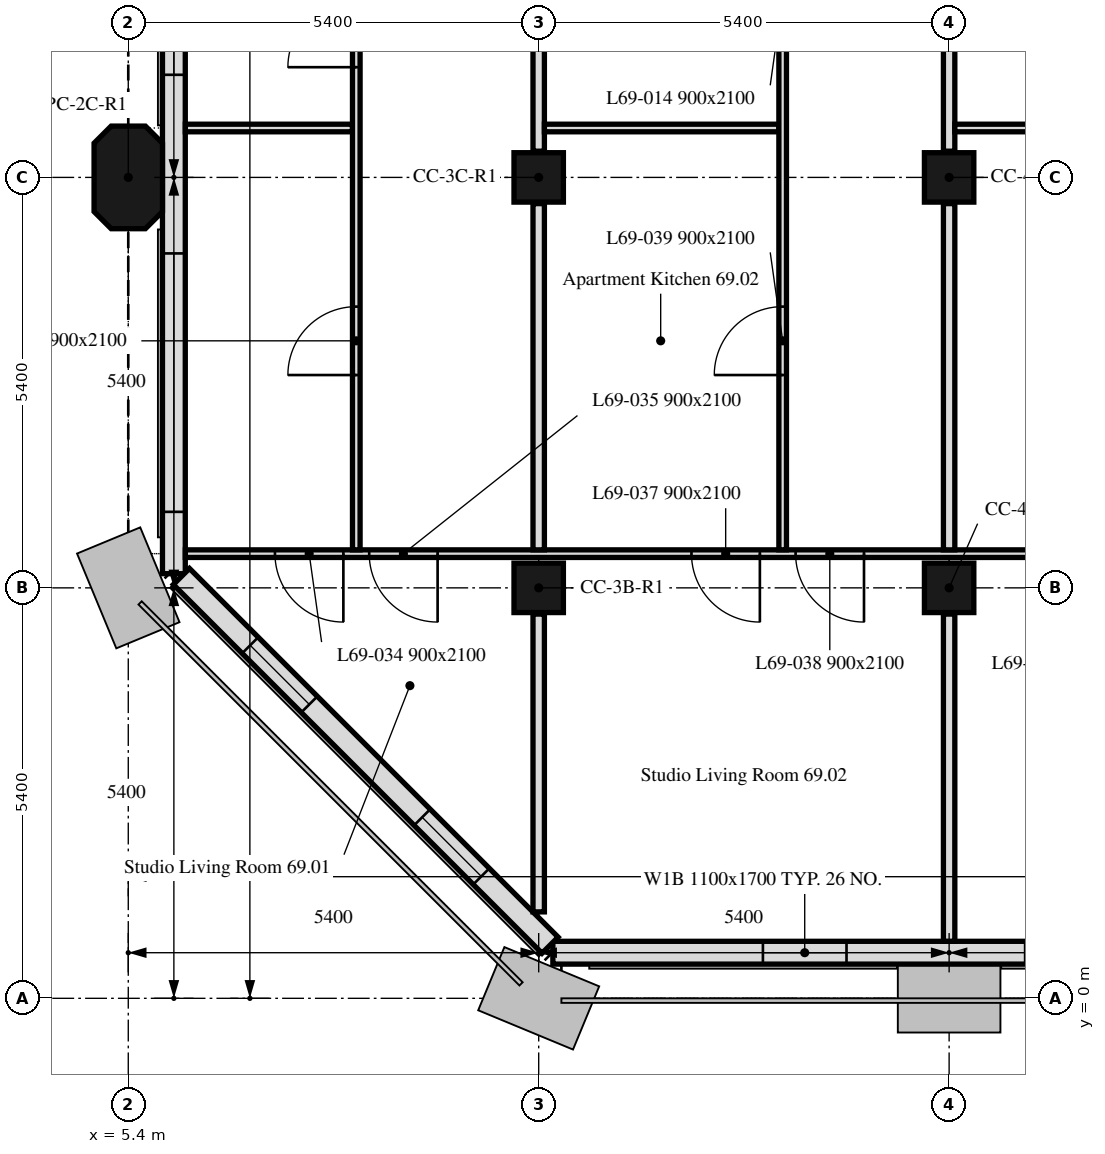
"""IFC4 building model, lengths in metres.
Left out: names, types, materials, properties, quantities, classifications, styles, units other than length and angle.
Written with IfcOpenShell. Run it as: python <this file> out.ifc"""

import sys

from ifc_helpers import new_model, si_unit, direction, frame, frame_2d, origin, origin_2d, place, context, subcontext, project, spatial, polyline, rectangle, outline, extrude, element, fill, save


model = new_model("IFC4")
c1 = context("Model", 3, precision=1e-05, world=origin(), true_north=direction((0.0, 1.0)))
c2 = subcontext(c1, "Body", "Model", "MODEL_VIEW")
j1 = project(units=[si_unit("LENGTHUNIT", "METRE"), si_unit("PLANEANGLEUNIT", "RADIAN")], contexts=[c1])
p1 = place(None, origin())
s1 = spatial("IfcSite", under=j1, at=p1, CompositionType="ELEMENT")
p2 = place(p1, origin())
s2 = spatial("IfcBuilding", under=s1, at=p2, CompositionType="ELEMENT")
p3 = place(p2, frame((0.0, 0.0, 281.8)))
s3 = spatial("IfcBuildingStorey", under=s2, at=p3, CompositionType="ELEMENT", Elevation=281.8)
for number, where, z_axis, x_axis in (
    (1, (10.8, 5.4, 0.0), (0.0, 0.0, 1.0), (1.0, 0.0, 0.0)),
    (2, (16.2, 5.4, 0.0), (0.0, 0.0, 1.0), (1.0, 0.0, 0.0)),
):
    element("IfcColumn", number, at=place(p3, frame(where, z_axis=z_axis, x_axis=x_axis)), inside=s3, PredefinedType="COLUMN", context=c2, shape_type="SweptSolid", body=[
        extrude(rectangle(XDim=0.65, YDim=0.65, at=origin_2d()), origin(), (0.0, 0.0, 1.0), 3.0),
    ])
p4 = place(p3, frame((5.4, 10.8, 0.0), z_axis=(0.0, 0.0, 1.0), x_axis=(0.0, 1.0, 0.0)))
e3 = element("IfcColumn", 3, at=p4, inside=s3, PredefinedType="COLUMN", context=c2, shape_type="SweptSolid", body=[
    extrude(outline(polyline([(-0.45, -0.45), (0.45, -0.45), (0.675, -0.225), (0.675, 0.225), (0.45, 0.45), (-0.45, 0.45), (-0.675, 0.225), (-0.675, -0.225), (-0.45, -0.45)])), origin(), (0.0, 0.0, 1.0), 3.0),
])
for number, where, z_axis, x_axis in (
    (4, (10.8, 10.8, 0.0), (0.0, 0.0, 1.0), (1.0, 0.0, 0.0)),
    (5, (16.2, 10.8, 0.0), (0.0, 0.0, 1.0), (1.0, 0.0, 0.0)),
):
    element("IfcColumn", number, at=place(p3, frame(where, z_axis=z_axis, x_axis=x_axis)), inside=s3, PredefinedType="COLUMN", context=c2, shape_type="SweptSolid", body=[
        extrude(rectangle(XDim=0.65, YDim=0.65, at=origin_2d()), origin(), (0.0, 0.0, 1.0), 3.0),
    ])
p5 = place(p3, frame((10.986, 0.6, 0.0), z_axis=(0.0, 0.0, 1.0), x_axis=(1.0, 0.0, 0.0)))
e6 = element("IfcWall", 6, at=p5, inside=s3, PredefinedType="SOLIDWALL", context=c2, shape_type="SweptSolid", body=[
    extrude(rectangle(XDim=32.027, YDim=0.3, at=frame_2d((16.014, 0.0))), origin(), (0.0, 0.0, 1.0), 3.0),
])
p6 = place(p5, frame((2.764, 0.0, 0.9)))
e7 = element("IfcOpeningElement", 7, at=p6, cuts=e6, PredefinedType="OPENING", context=c2, shape_type="SweptSolid", body=[
    extrude(rectangle(XDim=1.1, YDim=1.7, at=frame_2d((0.55, 0.85))), frame((0.0, 0.16, 0.0), z_axis=(0.0, -1.0, 0.0), x_axis=(1.0, 0.0, 0.0)), (0.0, 0.0, 1.0), 0.32),
])
p7 = place(p5, frame((6.214, 0.0, 0.9)))
e8 = element("IfcOpeningElement", 8, at=p7, cuts=e6, PredefinedType="OPENING", context=c2, shape_type="SweptSolid", body=[
    extrude(rectangle(XDim=3.4, YDim=1.7, at=frame_2d((1.7, 0.85))), frame((0.0, 0.16, 0.0), z_axis=(0.0, -1.0, 0.0), x_axis=(1.0, 0.0, 0.0)), (0.0, 0.0, 1.0), 0.32),
])
p8 = place(p5, frame((13.564, 0.0, 0.9)))
e9 = element("IfcOpeningElement", 9, at=p8, cuts=e6, PredefinedType="OPENING", context=c2, shape_type="SweptSolid", body=[
    extrude(rectangle(XDim=1.1, YDim=1.7, at=frame_2d((0.55, 0.85))), frame((0.0, 0.16, 0.0), z_axis=(0.0, -1.0, 0.0), x_axis=(1.0, 0.0, 0.0)), (0.0, 0.0, 1.0), 0.32),
])
p9 = place(p5, frame((17.014, 0.0, 0.9)))
e10 = element("IfcOpeningElement", 10, at=p9, cuts=e6, PredefinedType="OPENING", context=c2, shape_type="SweptSolid", body=[
    extrude(rectangle(XDim=3.4, YDim=1.7, at=frame_2d((1.7, 0.85))), frame((0.0, 0.16, 0.0), z_axis=(0.0, -1.0, 0.0), x_axis=(1.0, 0.0, 0.0)), (0.0, 0.0, 1.0), 0.32),
])
p10 = place(p5, frame((24.364, 0.0, 0.9)))
e11 = element("IfcOpeningElement", 11, at=p10, cuts=e6, PredefinedType="OPENING", context=c2, shape_type="SweptSolid", body=[
    extrude(rectangle(XDim=1.1, YDim=1.7, at=frame_2d((0.55, 0.85))), frame((0.0, 0.16, 0.0), z_axis=(0.0, -1.0, 0.0), x_axis=(1.0, 0.0, 0.0)), (0.0, 0.0, 1.0), 0.32),
])
p11 = place(p5, frame((27.814, 0.0, 0.9)))
e12 = element("IfcOpeningElement", 12, at=p11, cuts=e6, PredefinedType="OPENING", context=c2, shape_type="SweptSolid", body=[
    extrude(rectangle(XDim=3.4, YDim=1.7, at=frame_2d((1.7, 0.85))), frame((0.0, 0.16, 0.0), z_axis=(0.0, -1.0, 0.0), x_axis=(1.0, 0.0, 0.0)), (0.0, 0.0, 1.0), 0.32),
])
p12 = place(p3, frame((6.0, 16.2, 0.0), z_axis=(0.0, 0.0, 1.0), x_axis=(0.0, -1.0, 0.0)))
e13 = element("IfcWall", 13, at=p12, inside=s3, PredefinedType="SOLIDWALL", context=c2, shape_type="SweptSolid", body=[
    extrude(rectangle(XDim=10.614, YDim=0.3, at=frame_2d((5.307, 0.0))), origin(), (0.0, 0.0, 1.0), 3.0),
])
p13 = place(p12, frame((1.0, 0.0, 0.9)))
e14 = element("IfcOpeningElement", 14, at=p13, cuts=e13, PredefinedType="OPENING", context=c2, shape_type="SweptSolid", body=[
    extrude(rectangle(XDim=1.1, YDim=1.7, at=frame_2d((0.55, 0.85))), frame((0.0, 0.16, 0.0), z_axis=(0.0, -1.0, 0.0), x_axis=(1.0, 0.0, 0.0)), (0.0, 0.0, 1.0), 0.32),
])
p14 = place(p12, frame((2.95, 0.0, 0.9)))
e15 = element("IfcOpeningElement", 15, at=p14, cuts=e13, PredefinedType="OPENING", context=c2, shape_type="SweptSolid", body=[
    extrude(rectangle(XDim=1.1, YDim=1.7, at=frame_2d((0.55, 0.85))), frame((0.0, 0.16, 0.0), z_axis=(0.0, -1.0, 0.0), x_axis=(1.0, 0.0, 0.0)), (0.0, 0.0, 1.0), 0.32),
])
p15 = place(p12, frame((6.4, 0.0, 0.9)))
e16 = element("IfcOpeningElement", 16, at=p15, cuts=e13, PredefinedType="OPENING", context=c2, shape_type="SweptSolid", body=[
    extrude(rectangle(XDim=3.4, YDim=1.7, at=frame_2d((1.7, 0.85))), frame((0.0, 0.16, 0.0), z_axis=(0.0, -1.0, 0.0), x_axis=(1.0, 0.0, 0.0)), (0.0, 0.0, 1.0), 0.32),
])
p16 = place(p3, frame((6.099, 5.55, 0.0), z_axis=(0.0, 0.0, 1.0), x_axis=(0.707106781187, -0.707106781187, 0.0)))
e17 = element("IfcWall", 17, at=p16, inside=s3, PredefinedType="SOLIDWALL", context=c2, shape_type="SweptSolid", body=[
    extrude(rectangle(XDim=6.86, YDim=0.3, at=frame_2d((3.43, 0.0))), origin(), (0.0, 0.0, 1.0), 3.0),
])
p17 = place(p16, frame((1.28, 0.0, 0.9)))
e18 = element("IfcOpeningElement", 18, at=p17, cuts=e17, PredefinedType="OPENING", context=c2, shape_type="SweptSolid", body=[
    extrude(rectangle(XDim=1.1, YDim=1.7, at=frame_2d((0.55, 0.85))), frame((0.0, 0.16, 0.0), z_axis=(0.0, -1.0, 0.0), x_axis=(1.0, 0.0, 0.0)), (0.0, 0.0, 1.0), 0.32),
])
p18 = place(p16, frame((4.48, 0.0, 0.9)))
e19 = element("IfcOpeningElement", 19, at=p18, cuts=e17, PredefinedType="OPENING", context=c2, shape_type="SweptSolid", body=[
    extrude(rectangle(XDim=1.1, YDim=1.7, at=frame_2d((0.55, 0.85))), frame((0.0, 0.16, 0.0), z_axis=(0.0, -1.0, 0.0), x_axis=(1.0, 0.0, 0.0)), (0.0, 0.0, 1.0), 0.32),
])
p19 = place(p3, frame((10.8, 1.137, 0.0), z_axis=(0.0, 0.0, 1.0), x_axis=(0.0, 1.0, 0.0)))
e20 = element("IfcWall", 20, at=p19, inside=s3, PredefinedType="PARTITIONING", context=c2, shape_type="SweptSolid", body=[
    extrude(rectangle(XDim=3.918, YDim=0.15, at=frame_2d((1.959, 0.0))), origin(), (0.0, 0.0, 1.0), 3.0),
])
p20 = place(p3, frame((37.652, 5.85, 0.0), z_axis=(0.0, 0.0, 1.0), x_axis=(-1.0, 0.0, 0.0)))
e21 = element("IfcWall", 21, at=p20, inside=s3, PredefinedType="PARTITIONING", context=c2, shape_type="SweptSolid", body=[
    extrude(rectangle(XDim=31.501, YDim=0.1, at=frame_2d((15.75, 0.0))), origin(), (0.0, 0.0, 1.0), 2.4),
])
p21 = place(p20, frame((12.923, 0.0, 0.0)))
e22 = element("IfcOpeningElement", 22, at=p21, cuts=e21, PredefinedType="OPENING", context=c2, shape_type="SweptSolid", body=[
    extrude(rectangle(XDim=0.9, YDim=2.1, at=frame_2d((0.45, 1.05))), frame((0.0, 0.05, 0.0), z_axis=(0.0, -1.0, 0.0), x_axis=(1.0, 0.0, 0.0)), (0.0, 0.0, 1.0), 0.1),
])
p22 = place(p20, frame((29.422, 0.0, 0.0)))
e23 = element("IfcOpeningElement", 23, at=p22, cuts=e21, PredefinedType="OPENING", context=c2, shape_type="SweptSolid", body=[
    extrude(rectangle(XDim=0.9, YDim=2.1, at=frame_2d((0.45, 1.05))), frame((0.0, 0.05, 0.0), z_axis=(0.0, -1.0, 0.0), x_axis=(1.0, 0.0, 0.0)), (0.0, 0.0, 1.0), 0.1),
])
p23 = place(p20, frame((28.182, 0.0, 0.0)))
e24 = element("IfcOpeningElement", 24, at=p23, cuts=e21, PredefinedType="OPENING", context=c2, shape_type="SweptSolid", body=[
    extrude(rectangle(XDim=0.9, YDim=2.1, at=frame_2d((0.45, 1.05))), frame((0.0, 0.05, 0.0), z_axis=(0.0, -1.0, 0.0), x_axis=(1.0, 0.0, 0.0)), (0.0, 0.0, 1.0), 0.1),
])
p24 = place(p20, frame((23.942, 0.0, 0.0)))
e25 = element("IfcOpeningElement", 25, at=p24, cuts=e21, PredefinedType="OPENING", context=c2, shape_type="SweptSolid", body=[
    extrude(rectangle(XDim=0.9, YDim=2.1, at=frame_2d((0.45, 1.05))), frame((0.0, 0.05, 0.0), z_axis=(0.0, -1.0, 0.0), x_axis=(1.0, 0.0, 0.0)), (0.0, 0.0, 1.0), 0.1),
])
p25 = place(p20, frame((22.572, 0.0, 0.0)))
e26 = element("IfcOpeningElement", 26, at=p25, cuts=e21, PredefinedType="OPENING", context=c2, shape_type="SweptSolid", body=[
    extrude(rectangle(XDim=0.9, YDim=2.1, at=frame_2d((0.45, 1.05))), frame((0.0, 0.05, 0.0), z_axis=(0.0, -1.0, 0.0), x_axis=(1.0, 0.0, 0.0)), (0.0, 0.0, 1.0), 0.1),
])
p26 = place(p20, frame((19.466, 0.0, 0.0)))
e27 = element("IfcOpeningElement", 27, at=p26, cuts=e21, PredefinedType="OPENING", context=c2, shape_type="SweptSolid", body=[
    extrude(rectangle(XDim=0.9, YDim=2.1, at=frame_2d((0.45, 1.05))), frame((0.0, 0.05, 0.0), z_axis=(0.0, -1.0, 0.0), x_axis=(1.0, 0.0, 0.0)), (0.0, 0.0, 1.0), 0.1),
])
p27 = place(p20, frame((9.19, 0.0, 0.0)))
e28 = element("IfcOpeningElement", 28, at=p27, cuts=e21, PredefinedType="OPENING", context=c2, shape_type="SweptSolid", body=[
    extrude(rectangle(XDim=0.9, YDim=2.1, at=frame_2d((0.45, 1.05))), frame((0.0, 0.05, 0.0), z_axis=(0.0, -1.0, 0.0), x_axis=(1.0, 0.0, 0.0)), (0.0, 0.0, 1.0), 0.1),
])
p28 = place(p20, frame((7.512, 0.0, 0.0)))
e29 = element("IfcOpeningElement", 29, at=p28, cuts=e21, PredefinedType="OPENING", context=c2, shape_type="SweptSolid", body=[
    extrude(rectangle(XDim=0.9, YDim=2.1, at=frame_2d((0.45, 1.05))), frame((0.0, 0.05, 0.0), z_axis=(0.0, -1.0, 0.0), x_axis=(1.0, 0.0, 0.0)), (0.0, 0.0, 1.0), 0.1),
])
p29 = place(p20, frame((2.952, 0.0, 0.0)))
e30 = element("IfcOpeningElement", 30, at=p29, cuts=e21, PredefinedType="OPENING", context=c2, shape_type="SweptSolid", body=[
    extrude(rectangle(XDim=0.9, YDim=2.1, at=frame_2d((0.45, 1.05))), frame((0.0, 0.05, 0.0), z_axis=(0.0, -1.0, 0.0), x_axis=(1.0, 0.0, 0.0)), (0.0, 0.0, 1.0), 0.1),
])
p30 = place(p20, frame((18.096, 0.0, 0.0)))
e31 = element("IfcOpeningElement", 31, at=p30, cuts=e21, PredefinedType="OPENING", context=c2, shape_type="SweptSolid", body=[
    extrude(rectangle(XDim=0.9, YDim=2.1, at=frame_2d((0.45, 1.05))), frame((0.0, 0.05, 0.0), z_axis=(0.0, -1.0, 0.0), x_axis=(1.0, 0.0, 0.0)), (0.0, 0.0, 1.0), 0.1),
])
p31 = place(p3, frame((8.35, 11.45, 0.0), z_axis=(0.0, 0.0, 1.0), x_axis=(-1.0, 0.0, 0.0)))
e32 = element("IfcWall", 32, at=p31, inside=s3, PredefinedType="PARTITIONING", context=c2, shape_type="SweptSolid", body=[
    extrude(rectangle(XDim=2.199, YDim=0.1, at=frame_2d((1.1, 0.0))), origin(), (0.0, 0.0, 1.0), 3.0),
])
p32 = place(p3, frame((8.4, 5.9, 0.0), z_axis=(0.0, 0.0, 1.0), x_axis=(0.0, 1.0, 0.0)))
e33 = element("IfcWall", 33, at=p32, inside=s3, PredefinedType="PARTITIONING", context=c2, shape_type="SweptSolid", body=[
    extrude(rectangle(XDim=7.975, YDim=0.1, at=frame_2d((3.988, 0.0))), origin(), (0.0, 0.0, 1.0), 3.0),
])
p33 = place(p32, frame((6.35, 0.0, 0.0)))
e34 = element("IfcOpeningElement", 34, at=p33, cuts=e33, PredefinedType="OPENING", context=c2, shape_type="SweptSolid", body=[
    extrude(rectangle(XDim=0.9, YDim=2.1, at=frame_2d((0.45, 1.05))), frame((0.0, 0.05, 0.0), z_axis=(0.0, -1.0, 0.0), x_axis=(1.0, 0.0, 0.0)), (0.0, 0.0, 1.0), 0.1),
])
p34 = place(p32, frame((2.3, 0.0, 0.0)))
e35 = element("IfcOpeningElement", 35, at=p34, cuts=e33, PredefinedType="OPENING", context=c2, shape_type="SweptSolid", body=[
    extrude(rectangle(XDim=0.9, YDim=2.1, at=frame_2d((0.45, 1.05))), frame((0.0, 0.05, 0.0), z_axis=(0.0, -1.0, 0.0), x_axis=(1.0, 0.0, 0.0)), (0.0, 0.0, 1.0), 0.1),
])
p35 = place(p3, frame((10.8, 5.9, 0.0), z_axis=(0.0, 0.0, 1.0), x_axis=(0.0, 1.0, 0.0)))
e36 = element("IfcWall", 36, at=p35, inside=s3, PredefinedType="PARTITIONING", context=c2, shape_type="SweptSolid", body=[
    extrude(rectangle(XDim=4.555, YDim=0.15, at=frame_2d((2.278, 0.0))), origin(), (0.0, 0.0, 1.0), 3.0),
])
p36 = place(p3, frame((10.8, 11.145, 0.0), z_axis=(0.0, 0.0, 1.0), x_axis=(0.0, 1.0, 0.0)))
e37 = element("IfcWall", 37, at=p36, inside=s3, PredefinedType="PARTITIONING", context=c2, shape_type="SweptSolid", body=[
    extrude(rectangle(XDim=2.73, YDim=0.15, at=frame_2d((1.365, 0.0))), origin(), (0.0, 0.0, 1.0), 3.0),
])
p37 = place(p3, frame((16.2, 0.751, 0.0), z_axis=(0.0, 0.0, 1.0), x_axis=(0.0, 1.0, 0.0)))
e38 = element("IfcWall", 38, at=p37, inside=s3, PredefinedType="PARTITIONING", context=c2, shape_type="SweptSolid", body=[
    extrude(rectangle(XDim=4.304, YDim=0.15, at=frame_2d((2.152, 0.0))), origin(), (0.0, 0.0, 1.0), 2.4),
])
p38 = place(p3, frame((13.96, 11.45, 0.0), z_axis=(0.0, 0.0, 1.0), x_axis=(-1.0, 0.0, 0.0)))
e39 = element("IfcWall", 39, at=p38, inside=s3, PredefinedType="PARTITIONING", context=c2, shape_type="SweptSolid", body=[
    extrude(rectangle(XDim=3.085, YDim=0.1, at=frame_2d((1.542, 0.0))), origin(), (0.0, 0.0, 1.0), 3.0),
])
p39 = place(p3, frame((14.01, 5.9, 0.0), z_axis=(0.0, 0.0, 1.0), x_axis=(0.0, 1.0, 0.0)))
e40 = element("IfcWall", 40, at=p39, inside=s3, PredefinedType="PARTITIONING", context=c2, shape_type="SweptSolid", body=[
    extrude(rectangle(XDim=7.975, YDim=0.1, at=frame_2d((3.988, 0.0))), origin(), (0.0, 0.0, 1.0), 3.0),
])
p40 = place(p39, frame((6.825, 0.0, 0.0)))
e41 = element("IfcOpeningElement", 41, at=p40, cuts=e40, PredefinedType="OPENING", context=c2, shape_type="SweptSolid", body=[
    extrude(rectangle(XDim=0.9, YDim=2.1, at=frame_2d((0.45, 1.05))), frame((0.0, 0.05, 0.0), z_axis=(0.0, -1.0, 0.0), x_axis=(1.0, 0.0, 0.0)), (0.0, 0.0, 1.0), 0.1),
])
p41 = place(p39, frame((2.3, 0.0, 0.0)))
e42 = element("IfcOpeningElement", 42, at=p41, cuts=e40, PredefinedType="OPENING", context=c2, shape_type="SweptSolid", body=[
    extrude(rectangle(XDim=0.9, YDim=2.1, at=frame_2d((0.45, 1.05))), frame((0.0, 0.05, 0.0), z_axis=(0.0, -1.0, 0.0), x_axis=(1.0, 0.0, 0.0)), (0.0, 0.0, 1.0), 0.1),
])
p42 = place(p3, frame((16.2, 5.9, 0.0), z_axis=(0.0, 0.0, 1.0), x_axis=(0.0, 1.0, 0.0)))
e43 = element("IfcWall", 43, at=p42, inside=s3, PredefinedType="PARTITIONING", context=c2, shape_type="SweptSolid", body=[
    extrude(rectangle(XDim=4.555, YDim=0.15, at=frame_2d((2.278, 0.0))), origin(), (0.0, 0.0, 1.0), 2.4),
])
p43 = place(p3, frame((16.2, 11.145, 0.0), z_axis=(0.0, 0.0, 1.0), x_axis=(0.0, 1.0, 0.0)))
e44 = element("IfcWall", 44, at=p43, inside=s3, PredefinedType="PARTITIONING", context=c2, shape_type="SweptSolid", body=[
    extrude(rectangle(XDim=2.73, YDim=0.15, at=frame_2d((1.365, 0.0))), origin(), (0.0, 0.0, 1.0), 2.4),
])
p44 = place(p3, frame((18.306, 11.45, 0.0), z_axis=(0.0, 0.0, 1.0), x_axis=(-1.0, 0.0, 0.0)))
e45 = element("IfcWall", 45, at=p44, inside=s3, PredefinedType="PARTITIONING", context=c2, shape_type="SweptSolid", body=[
    extrude(rectangle(XDim=2.031, YDim=0.1, at=frame_2d((1.016, 0.0))), origin(), (0.0, 0.0, 1.0), 3.0),
])
p45 = place(p6, origin())
e46 = element("IfcWindow", 46, at=p45, inside=s3, PartitioningType="SINGLE_PANEL", PredefinedType="WINDOW", context=c2, shape_type="SweptSolid", body=[
    extrude(rectangle(XDim=1.1, YDim=1.7, at=frame_2d((0.55, 0.85))), frame((0.0, 0.03, 0.0), z_axis=(0.0, -1.0, 0.0), x_axis=(1.0, 0.0, 0.0)), (0.0, 0.0, 1.0), 0.06),
])
fill(e7, e46)
p46 = place(p14, origin())
e47 = element("IfcWindow", 47, at=p46, inside=s3, PartitioningType="SINGLE_PANEL", PredefinedType="WINDOW", context=c2, shape_type="SweptSolid", body=[
    extrude(rectangle(XDim=1.1, YDim=1.7, at=frame_2d((0.55, 0.85))), frame((0.0, 0.03, 0.0), z_axis=(0.0, -1.0, 0.0), x_axis=(1.0, 0.0, 0.0)), (0.0, 0.0, 1.0), 0.06),
])
fill(e15, e47)
p47 = place(p15, origin())
e48 = element("IfcWindow", 48, at=p47, inside=s3, PartitioningType="SINGLE_PANEL", PredefinedType="WINDOW", context=c2, shape_type="SweptSolid", body=[
    extrude(rectangle(XDim=3.4, YDim=1.7, at=frame_2d((1.7, 0.85))), frame((0.0, 0.03, 0.0), z_axis=(0.0, -1.0, 0.0), x_axis=(1.0, 0.0, 0.0)), (0.0, 0.0, 1.0), 0.06),
])
fill(e16, e48)
p48 = place(p17, origin())
e49 = element("IfcWindow", 49, at=p48, inside=s3, PartitioningType="SINGLE_PANEL", PredefinedType="WINDOW", context=c2, shape_type="SweptSolid", body=[
    extrude(rectangle(XDim=1.1, YDim=1.7, at=frame_2d((0.55, 0.85))), frame((0.0, 0.03, 0.0), z_axis=(0.0, -1.0, 0.0), x_axis=(1.0, 0.0, 0.0)), (0.0, 0.0, 1.0), 0.06),
])
fill(e18, e49)
p49 = place(p18, origin())
e50 = element("IfcWindow", 50, at=p49, inside=s3, PartitioningType="SINGLE_PANEL", PredefinedType="WINDOW", context=c2, shape_type="SweptSolid", body=[
    extrude(rectangle(XDim=1.1, YDim=1.7, at=frame_2d((0.55, 0.85))), frame((0.0, 0.03, 0.0), z_axis=(0.0, -1.0, 0.0), x_axis=(1.0, 0.0, 0.0)), (0.0, 0.0, 1.0), 0.06),
])
fill(e19, e50)
p50 = place(p33, origin())
e51 = element("IfcDoor", 51, at=p50, inside=s3, OperationType="SINGLE_SWING_RIGHT", PredefinedType="DOOR", context=c2, shape_type="SweptSolid", body=[
    extrude(rectangle(XDim=0.9, YDim=2.1, at=frame_2d((0.45, 1.05))), frame((0.0, 0.025, 0.0), z_axis=(0.0, -1.0, 0.0), x_axis=(1.0, 0.0, 0.0)), (0.0, 0.0, 1.0), 0.05),
])
fill(e34, e51)
p51 = place(p22, origin())
e52 = element("IfcDoor", 52, at=p51, inside=s3, OperationType="SINGLE_SWING_LEFT", PredefinedType="DOOR", context=c2, shape_type="SweptSolid", body=[
    extrude(rectangle(XDim=0.9, YDim=2.1, at=frame_2d((0.45, 1.05))), frame((0.0, 0.025, 0.0), z_axis=(0.0, -1.0, 0.0), x_axis=(1.0, 0.0, 0.0)), (0.0, 0.0, 1.0), 0.05),
])
fill(e23, e52)
p52 = place(p23, origin())
e53 = element("IfcDoor", 53, at=p52, inside=s3, OperationType="SINGLE_SWING_RIGHT", PredefinedType="DOOR", context=c2, shape_type="SweptSolid", body=[
    extrude(rectangle(XDim=0.9, YDim=2.1, at=frame_2d((0.45, 1.05))), frame((0.0, 0.025, 0.0), z_axis=(0.0, -1.0, 0.0), x_axis=(1.0, 0.0, 0.0)), (0.0, 0.0, 1.0), 0.05),
])
fill(e24, e53)
p53 = place(p34, origin())
e54 = element("IfcDoor", 54, at=p53, inside=s3, OperationType="SINGLE_SWING_LEFT", PredefinedType="DOOR", context=c2, shape_type="SweptSolid", body=[
    extrude(rectangle(XDim=0.9, YDim=2.1, at=frame_2d((0.45, 1.05))), frame((0.0, 0.025, 0.0), z_axis=(0.0, -1.0, 0.0), x_axis=(1.0, 0.0, 0.0)), (0.0, 0.0, 1.0), 0.05),
])
fill(e35, e54)
p54 = place(p24, origin())
e55 = element("IfcDoor", 55, at=p54, inside=s3, OperationType="SINGLE_SWING_LEFT", PredefinedType="DOOR", context=c2, shape_type="SweptSolid", body=[
    extrude(rectangle(XDim=0.9, YDim=2.1, at=frame_2d((0.45, 1.05))), frame((0.0, 0.025, 0.0), z_axis=(0.0, -1.0, 0.0), x_axis=(1.0, 0.0, 0.0)), (0.0, 0.0, 1.0), 0.05),
])
fill(e25, e55)
p55 = place(p25, origin())
e56 = element("IfcDoor", 56, at=p55, inside=s3, OperationType="SINGLE_SWING_RIGHT", PredefinedType="DOOR", context=c2, shape_type="SweptSolid", body=[
    extrude(rectangle(XDim=0.9, YDim=2.1, at=frame_2d((0.45, 1.05))), frame((0.0, 0.025, 0.0), z_axis=(0.0, -1.0, 0.0), x_axis=(1.0, 0.0, 0.0)), (0.0, 0.0, 1.0), 0.05),
])
fill(e26, e56)
p56 = place(p41, origin())
e57 = element("IfcDoor", 57, at=p56, inside=s3, OperationType="SINGLE_SWING_RIGHT", PredefinedType="DOOR", context=c2, shape_type="SweptSolid", body=[
    extrude(rectangle(XDim=0.9, YDim=2.1, at=frame_2d((0.45, 1.05))), frame((0.0, 0.025, 0.0), z_axis=(0.0, -1.0, 0.0), x_axis=(1.0, 0.0, 0.0)), (0.0, 0.0, 1.0), 0.05),
])
fill(e42, e57)
save(model, sys.argv[1])
